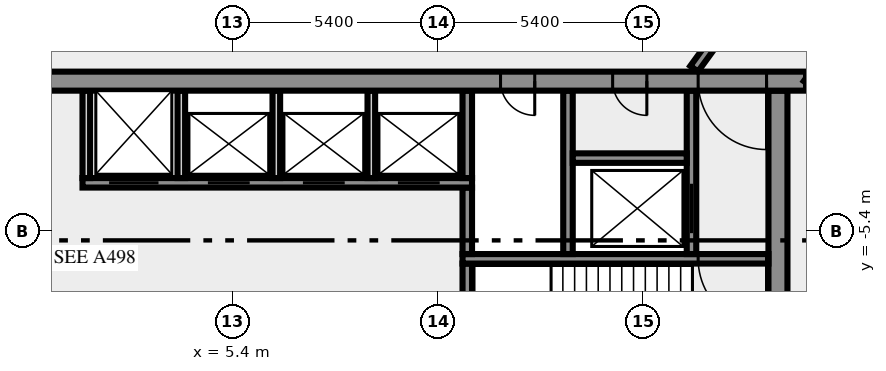
"""IFC4 building model, lengths in metres.
Left out: names, types, materials, properties, quantities, classifications, styles, units other than length and angle.
Written with IfcOpenShell. Run it as: python <this file> out.ifc"""

import sys

from ifc_helpers import new_model, si_unit, direction, frame, frame_2d, origin, place, context, subcontext, project, spatial, rectangle, extrude, element, fill, save


model = new_model("IFC4")
c1 = context("Model", 3, precision=1e-05, world=origin(), true_north=direction((0.0, 1.0)))
c2 = subcontext(c1, "Body", "Model", "MODEL_VIEW")
j1 = project(units=[si_unit("LENGTHUNIT", "METRE"), si_unit("PLANEANGLEUNIT", "RADIAN")], contexts=[c1])
p1 = place(None, origin())
s1 = spatial("IfcSite", under=j1, at=p1, CompositionType="ELEMENT")
p2 = place(p1, origin())
s2 = spatial("IfcBuilding", under=s1, at=p2, CompositionType="ELEMENT")
p3 = place(p2, frame((0.0, 0.0, 226.0)))
s3 = spatial("IfcBuildingStorey", under=s2, at=p3, CompositionType="ELEMENT", Elevation=226.0)
p4 = place(p3, frame((19.75, -10.5, 0.0), z_axis=(0.0, 0.0, 1.0), x_axis=(0.0, 1.0, 0.0)))
e1 = element("IfcWall", 1, at=p4, inside=s3, PredefinedType="SHEAR", context=c2, shape_type="SweptSolid", body=[
    extrude(rectangle(XDim=8.8, YDim=0.5, at=frame_2d((4.4, 0.0))), origin(), (0.0, 0.0, 1.0), 3.65),
])
p5 = place(p3, frame((11.575, -7.25, 0.0), z_axis=(0.0, 0.0, 1.0), x_axis=(0.0, 1.0, 0.0)))
e2 = element("IfcWall", 2, at=p5, inside=s3, PredefinedType="SHEAR", context=c2, shape_type="SweptSolid", body=[
    extrude(rectangle(XDim=1.0, YDim=0.25, at=frame_2d((0.5, 0.0))), origin(), (0.0, 0.0, 1.0), 3.65),
])
p6 = place(p3, frame((19.5, -6.125, 0.0), z_axis=(0.0, 0.0, 1.0), x_axis=(-1.0, 0.0, 0.0)))
e3 = element("IfcWall", 3, at=p6, inside=s3, PredefinedType="SHEAR", context=c2, shape_type="SweptSolid", body=[
    extrude(rectangle(XDim=8.05, YDim=0.25, at=frame_2d((4.025, 0.0))), origin(), (0.0, 0.0, 1.0), 3.65),
])
p7 = place(p6, frame((0.05, 0.0, 0.0)))
e4 = element("IfcOpeningElement", 4, at=p7, cuts=e3, PredefinedType="OPENING", context=c2, shape_type="SweptSolid", body=[
    extrude(rectangle(XDim=1.8, YDim=2.1, at=frame_2d((0.9, 1.05))), frame((0.0, 0.135, 0.0), z_axis=(0.0, -1.0, 0.0), x_axis=(1.0, 0.0, 0.0)), (0.0, 0.0, 1.0), 0.27),
])
p8 = place(p3, frame((11.575, -6.0, 0.0), z_axis=(0.0, 0.0, 1.0), x_axis=(0.0, 1.0, 0.0)))
e5 = element("IfcWall", 5, at=p8, inside=s3, PredefinedType="SHEAR", context=c2, shape_type="SweptSolid", body=[
    extrude(rectangle(XDim=1.75, YDim=0.25, at=frame_2d((0.875, 0.0))), origin(), (0.0, 0.0, 1.0), 3.65),
])
p9 = place(p3, frame((14.225, -6.0, 0.0), z_axis=(0.0, 0.0, 1.0), x_axis=(0.0, 1.0, 0.0)))
e6 = element("IfcWall", 6, at=p9, inside=s3, PredefinedType="SHEAR", context=c2, shape_type="SweptSolid", body=[
    extrude(rectangle(XDim=4.3, YDim=0.25, at=frame_2d((2.15, 0.0))), origin(), (0.0, 0.0, 1.0), 3.65),
])
p10 = place(p3, frame((17.475, -6.0, 0.0), z_axis=(0.0, 0.0, 1.0), x_axis=(0.0, 1.0, 0.0)))
e7 = element("IfcWall", 7, at=p10, inside=s3, PredefinedType="SHEAR", context=c2, shape_type="SweptSolid", body=[
    extrude(rectangle(XDim=4.3, YDim=0.25, at=frame_2d((2.15, 0.0))), origin(), (0.0, 0.0, 1.0), 3.65),
])
p11 = place(p10, frame((0.55, 0.0, 0.0)))
e8 = element("IfcOpeningElement", 8, at=p11, cuts=e7, PredefinedType="OPENING", context=c2, shape_type="SweptSolid", body=[
    extrude(rectangle(XDim=1.3, YDim=2.1, at=frame_2d((0.65, 1.05))), frame((0.0, 0.135, 0.0), z_axis=(0.0, -1.0, 0.0), x_axis=(1.0, 0.0, 0.0)), (0.0, 0.0, 1.0), 0.27),
])
p12 = place(p3, frame((1.45, -4.125, 0.0), z_axis=(0.0, 0.0, 1.0), x_axis=(1.0, 0.0, 0.0)))
e9 = element("IfcWall", 9, at=p12, inside=s3, PredefinedType="SHEAR", context=c2, shape_type="SweptSolid", body=[
    extrude(rectangle(XDim=10.25, YDim=0.25, at=frame_2d((5.125, 0.0))), origin(), (0.0, 0.0, 1.0), 3.65),
])
p13 = place(p12, frame((0.7, 0.0, 0.0)))
e10 = element("IfcOpeningElement", 10, at=p13, cuts=e9, PredefinedType="OPENING", context=c2, shape_type="SweptSolid", body=[
    extrude(rectangle(XDim=1.3, YDim=2.1, at=frame_2d((0.65, 1.05))), frame((0.0, 0.135, 0.0), z_axis=(0.0, -1.0, 0.0), x_axis=(1.0, 0.0, 0.0)), (0.0, 0.0, 1.0), 0.27),
])
p14 = place(p12, frame((3.3, 0.0, 0.0)))
e11 = element("IfcOpeningElement", 11, at=p14, cuts=e9, PredefinedType="OPENING", context=c2, shape_type="SweptSolid", body=[
    extrude(rectangle(XDim=1.1, YDim=2.1, at=frame_2d((0.55, 1.05))), frame((0.0, 0.135, 0.0), z_axis=(0.0, -1.0, 0.0), x_axis=(1.0, 0.0, 0.0)), (0.0, 0.0, 1.0), 0.27),
])
p15 = place(p12, frame((5.8, 0.0, 0.0)))
e12 = element("IfcOpeningElement", 12, at=p15, cuts=e9, PredefinedType="OPENING", context=c2, shape_type="SweptSolid", body=[
    extrude(rectangle(XDim=1.1, YDim=2.1, at=frame_2d((0.55, 1.05))), frame((0.0, 0.135, 0.0), z_axis=(0.0, -1.0, 0.0), x_axis=(1.0, 0.0, 0.0)), (0.0, 0.0, 1.0), 0.27),
])
p16 = place(p12, frame((8.3, 0.0, 0.0)))
e13 = element("IfcOpeningElement", 13, at=p16, cuts=e9, PredefinedType="OPENING", context=c2, shape_type="SweptSolid", body=[
    extrude(rectangle(XDim=1.1, YDim=2.1, at=frame_2d((0.55, 1.05))), frame((0.0, 0.135, 0.0), z_axis=(0.0, -1.0, 0.0), x_axis=(1.0, 0.0, 0.0)), (0.0, 0.0, 1.0), 0.27),
])
for number, where, z_axis, x_axis in (
    (14, (1.55, -4.0, 0.0), (0.0, 0.0, 1.0), (0.0, 1.0, 0.0)),
    (15, (4.05, -4.0, 0.0), (0.0, 0.0, 1.0), (0.0, 1.0, 0.0)),
    (16, (6.55, -4.0, 0.0), (0.0, 0.0, 1.0), (0.0, 1.0, 0.0)),
    (17, (9.05, -4.0, 0.0), (0.0, 0.0, 1.0), (0.0, 1.0, 0.0)),
):
    element("IfcWall", number, at=place(p3, frame(where, z_axis=z_axis, x_axis=x_axis)), inside=s3, PredefinedType="SOLIDWALL", context=c2, shape_type="SweptSolid", body=[
        extrude(rectangle(XDim=2.3, YDim=0.2, at=frame_2d((1.15, 0.0))), origin(), (0.0, 0.0, 1.0), 3.65),
    ])
p17 = place(p3, frame((11.575, -4.0, 0.0), z_axis=(0.0, 0.0, 1.0), x_axis=(0.0, 1.0, 0.0)))
e18 = element("IfcWall", 18, at=p17, inside=s3, PredefinedType="SHEAR", context=c2, shape_type="SweptSolid", body=[
    extrude(rectangle(XDim=2.3, YDim=0.25, at=frame_2d((1.15, 0.0))), origin(), (0.0, 0.0, 1.0), 3.65),
])
p18 = place(p3, frame((14.35, -3.475, 0.0), z_axis=(0.0, 0.0, 1.0), x_axis=(1.0, 0.0, 0.0)))
e19 = element("IfcWall", 19, at=p18, inside=s3, PredefinedType="SHEAR", context=c2, shape_type="SweptSolid", body=[
    extrude(rectangle(XDim=3.0, YDim=0.25, at=frame_2d((1.5, 0.0))), origin(), (0.0, 0.0, 1.0), 3.65),
])
p19 = place(p3, frame((20.49, -1.45, 0.0), z_axis=(0.0, 0.0, 1.0), x_axis=(-1.0, 0.0, 0.0)))
e20 = element("IfcWall", 20, at=p19, inside=s3, PredefinedType="SHEAR", context=c2, shape_type="SweptSolid", body=[
    extrude(rectangle(XDim=40.98, YDim=0.5, at=frame_2d((20.49, 0.0))), origin(), (0.0, 0.0, 1.0), 3.65),
])
p20 = place(p19, frame((38.14, 0.0, 0.0)))
e21 = element("IfcOpeningElement", 21, at=p20, cuts=e20, PredefinedType="OPENING", context=c2, shape_type="SweptSolid", body=[
    extrude(rectangle(XDim=1.8, YDim=2.1, at=frame_2d((0.9, 1.05))), frame((0.0, 0.26, 0.0), z_axis=(0.0, -1.0, 0.0), x_axis=(1.0, 0.0, 0.0)), (0.0, 0.0, 1.0), 0.52),
])
p21 = place(p19, frame((36.728, 0.0, 0.0)))
e22 = element("IfcOpeningElement", 22, at=p21, cuts=e20, PredefinedType="OPENING", context=c2, shape_type="SweptSolid", body=[
    extrude(rectangle(XDim=0.8, YDim=2.1, at=frame_2d((0.4, 1.05))), frame((0.0, 0.26, 0.0), z_axis=(0.0, -1.0, 0.0), x_axis=(1.0, 0.0, 0.0)), (0.0, 0.0, 1.0), 0.52),
])
p22 = place(p19, frame((35.153, 0.0, 0.0)))
e23 = element("IfcOpeningElement", 23, at=p22, cuts=e20, PredefinedType="OPENING", context=c2, shape_type="SweptSolid", body=[
    extrude(rectangle(XDim=0.8, YDim=2.1, at=frame_2d((0.4, 1.05))), frame((0.0, 0.26, 0.0), z_axis=(0.0, -1.0, 0.0), x_axis=(1.0, 0.0, 0.0)), (0.0, 0.0, 1.0), 0.52),
])
p23 = place(p19, frame((32.94, 0.0, 0.0)))
e24 = element("IfcOpeningElement", 24, at=p23, cuts=e20, PredefinedType="OPENING", context=c2, shape_type="SweptSolid", body=[
    extrude(rectangle(XDim=0.9, YDim=2.1, at=frame_2d((0.45, 1.05))), frame((0.0, 0.26, 0.0), z_axis=(0.0, -1.0, 0.0), x_axis=(1.0, 0.0, 0.0)), (0.0, 0.0, 1.0), 0.52),
])
p24 = place(p19, frame((30.202, 0.0, 0.0)))
e25 = element("IfcOpeningElement", 25, at=p24, cuts=e20, PredefinedType="OPENING", context=c2, shape_type="SweptSolid", body=[
    extrude(rectangle(XDim=0.9, YDim=2.1, at=frame_2d((0.45, 1.05))), frame((0.0, 0.26, 0.0), z_axis=(0.0, -1.0, 0.0), x_axis=(1.0, 0.0, 0.0)), (0.0, 0.0, 1.0), 0.52),
])
p25 = place(p19, frame((27.74, 0.0, 0.0)))
e26 = element("IfcOpeningElement", 26, at=p25, cuts=e20, PredefinedType="OPENING", context=c2, shape_type="SweptSolid", body=[
    extrude(rectangle(XDim=0.9, YDim=2.1, at=frame_2d((0.45, 1.05))), frame((0.0, 0.26, 0.0), z_axis=(0.0, -1.0, 0.0), x_axis=(1.0, 0.0, 0.0)), (0.0, 0.0, 1.0), 0.52),
])
p26 = place(p19, frame((25.377, 0.0, 0.0)))
e27 = element("IfcOpeningElement", 27, at=p26, cuts=e20, PredefinedType="OPENING", context=c2, shape_type="SweptSolid", body=[
    extrude(rectangle(XDim=0.9, YDim=2.1, at=frame_2d((0.45, 1.05))), frame((0.0, 0.26, 0.0), z_axis=(0.0, -1.0, 0.0), x_axis=(1.0, 0.0, 0.0)), (0.0, 0.0, 1.0), 0.52),
])
p27 = place(p19, frame((20.74, 0.0, 0.0)))
e28 = element("IfcOpeningElement", 28, at=p27, cuts=e20, PredefinedType="OPENING", context=c2, shape_type="SweptSolid", body=[
    extrude(rectangle(XDim=2.0, YDim=2.1, at=frame_2d((1.0, 1.05))), frame((0.0, 0.26, 0.0), z_axis=(0.0, -1.0, 0.0), x_axis=(1.0, 0.0, 0.0)), (0.0, 0.0, 1.0), 0.52),
])
p28 = place(p19, frame((7.14, 0.0, 0.0)))
e29 = element("IfcOpeningElement", 29, at=p28, cuts=e20, PredefinedType="OPENING", context=c2, shape_type="SweptSolid", body=[
    extrude(rectangle(XDim=0.9, YDim=2.1, at=frame_2d((0.45, 1.05))), frame((0.0, 0.26, 0.0), z_axis=(0.0, -1.0, 0.0), x_axis=(1.0, 0.0, 0.0)), (0.0, 0.0, 1.0), 0.52),
])
p29 = place(p19, frame((4.19, 0.0, 0.0)))
e30 = element("IfcOpeningElement", 30, at=p29, cuts=e20, PredefinedType="OPENING", context=c2, shape_type="SweptSolid", body=[
    extrude(rectangle(XDim=0.9, YDim=2.1, at=frame_2d((0.45, 1.05))), frame((0.0, 0.26, 0.0), z_axis=(0.0, -1.0, 0.0), x_axis=(1.0, 0.0, 0.0)), (0.0, 0.0, 1.0), 0.52),
])
p30 = place(p19, frame((1.04, 0.0, 0.0)))
e31 = element("IfcOpeningElement", 31, at=p30, cuts=e20, PredefinedType="OPENING", context=c2, shape_type="SweptSolid", body=[
    extrude(rectangle(XDim=1.8, YDim=2.1, at=frame_2d((0.9, 1.05))), frame((0.0, 0.26, 0.0), z_axis=(0.0, -1.0, 0.0), x_axis=(1.0, 0.0, 0.0)), (0.0, 0.0, 1.0), 0.52),
])
p31 = place(p3, frame((17.545, -1.125, 0.0), z_axis=(0.0, 0.0, 1.0), x_axis=(0.587787966774, 0.809015022181, 0.0)))
e32 = element("IfcWall", 32, at=p31, inside=s3, PredefinedType="SOLIDWALL", context=c2, shape_type="SweptSolid", body=[
    extrude(rectangle(XDim=23.345, YDim=0.25, at=frame_2d((11.672, 0.0))), origin(), (0.0, 0.0, 1.0), 3.65),
])
p32 = place(p31, frame((3.441, 0.0, 0.0)))
e33 = element("IfcOpeningElement", 33, at=p32, cuts=e32, PredefinedType="OPENING", context=c2, shape_type="SweptSolid", body=[
    extrude(rectangle(XDim=0.9, YDim=2.1, at=frame_2d((0.45, 1.05))), frame((0.0, 0.135, 0.0), z_axis=(0.0, -1.0, 0.0), x_axis=(1.0, 0.0, 0.0)), (0.0, 0.0, 1.0), 0.27),
])
p33 = place(p3, frame((33.41, 16.203, 0.0), z_axis=(0.0, 0.0, 1.0), x_axis=(-0.587786711753, -0.809015934013, 0.0)))
e34 = element("IfcWall", 34, at=p33, inside=s3, PredefinedType="SOLIDWALL", context=c2, shape_type="SweptSolid", body=[
    extrude(rectangle(XDim=21.911, YDim=0.25, at=frame_2d((10.956, 0.0))), origin(), (0.0, 0.0, 1.0), 3.65),
])
p34 = place(p33, frame((20.479, 0.0, 0.0)))
e35 = element("IfcOpeningElement", 35, at=p34, cuts=e34, PredefinedType="OPENING", context=c2, shape_type="SweptSolid", body=[
    extrude(rectangle(XDim=0.9, YDim=2.1, at=frame_2d((0.45, 1.05))), frame((0.0, 0.135, 0.0), z_axis=(0.0, -1.0, 0.0), x_axis=(1.0, 0.0, 0.0)), (0.0, 0.0, 1.0), 0.27),
])
p35 = place(p7, origin())
e36 = element("IfcDoor", 36, at=p35, inside=s3, OperationType="DOUBLE_DOOR_SINGLE_SWING", PredefinedType="DOOR", context=c2, shape_type="SweptSolid", body=[
    extrude(rectangle(XDim=1.8, YDim=2.1, at=frame_2d((0.9, 1.05))), frame((0.0, 0.025, 0.0), z_axis=(0.0, -1.0, 0.0), x_axis=(1.0, 0.0, 0.0)), (0.0, 0.0, 1.0), 0.05),
])
fill(e4, e36)
p36 = place(p11, origin())
e37 = element("IfcDoor", 37, at=p36, inside=s3, OperationType="DOUBLE_DOOR_SLIDING", PredefinedType="DOOR", context=c2, shape_type="SweptSolid", body=[
    extrude(rectangle(XDim=1.3, YDim=2.1, at=frame_2d((0.65, 1.05))), frame((0.0, 0.025, 0.0), z_axis=(0.0, -1.0, 0.0), x_axis=(1.0, 0.0, 0.0)), (0.0, 0.0, 1.0), 0.05),
])
fill(e8, e37)
p37 = place(p13, origin())
e38 = element("IfcDoor", 38, at=p37, inside=s3, OperationType="DOUBLE_DOOR_SLIDING", PredefinedType="DOOR", context=c2, shape_type="SweptSolid", body=[
    extrude(rectangle(XDim=1.3, YDim=2.1, at=frame_2d((0.65, 1.05))), frame((0.0, 0.025, 0.0), z_axis=(0.0, -1.0, 0.0), x_axis=(1.0, 0.0, 0.0)), (0.0, 0.0, 1.0), 0.05),
])
fill(e10, e38)
p38 = place(p14, origin())
e39 = element("IfcDoor", 39, at=p38, inside=s3, OperationType="DOUBLE_DOOR_SLIDING", PredefinedType="DOOR", context=c2, shape_type="SweptSolid", body=[
    extrude(rectangle(XDim=1.1, YDim=2.1, at=frame_2d((0.55, 1.05))), frame((0.0, 0.025, 0.0), z_axis=(0.0, -1.0, 0.0), x_axis=(1.0, 0.0, 0.0)), (0.0, 0.0, 1.0), 0.05),
])
fill(e11, e39)
p39 = place(p15, origin())
e40 = element("IfcDoor", 40, at=p39, inside=s3, OperationType="DOUBLE_DOOR_SLIDING", PredefinedType="DOOR", context=c2, shape_type="SweptSolid", body=[
    extrude(rectangle(XDim=1.1, YDim=2.1, at=frame_2d((0.55, 1.05))), frame((0.0, 0.025, 0.0), z_axis=(0.0, -1.0, 0.0), x_axis=(1.0, 0.0, 0.0)), (0.0, 0.0, 1.0), 0.05),
])
fill(e12, e40)
p40 = place(p16, origin())
e41 = element("IfcDoor", 41, at=p40, inside=s3, OperationType="DOUBLE_DOOR_SLIDING", PredefinedType="DOOR", context=c2, shape_type="SweptSolid", body=[
    extrude(rectangle(XDim=1.1, YDim=2.1, at=frame_2d((0.55, 1.05))), frame((0.0, 0.025, 0.0), z_axis=(0.0, -1.0, 0.0), x_axis=(1.0, 0.0, 0.0)), (0.0, 0.0, 1.0), 0.05),
])
fill(e13, e41)
p41 = place(p28, origin())
e42 = element("IfcDoor", 42, at=p41, inside=s3, OperationType="SINGLE_SWING_LEFT", PredefinedType="DOOR", context=c2, shape_type="SweptSolid", body=[
    extrude(rectangle(XDim=0.9, YDim=2.1, at=frame_2d((0.45, 1.05))), frame((0.0, 0.025, 0.0), z_axis=(0.0, -1.0, 0.0), x_axis=(1.0, 0.0, 0.0)), (0.0, 0.0, 1.0), 0.05),
])
fill(e29, e42)
p42 = place(p29, origin())
e43 = element("IfcDoor", 43, at=p42, inside=s3, OperationType="SINGLE_SWING_LEFT", PredefinedType="DOOR", context=c2, shape_type="SweptSolid", body=[
    extrude(rectangle(XDim=0.9, YDim=2.1, at=frame_2d((0.45, 1.05))), frame((0.0, 0.025, 0.0), z_axis=(0.0, -1.0, 0.0), x_axis=(1.0, 0.0, 0.0)), (0.0, 0.0, 1.0), 0.05),
])
fill(e30, e43)
p43 = place(p30, origin())
e44 = element("IfcDoor", 44, at=p43, inside=s3, OperationType="DOUBLE_DOOR_SINGLE_SWING", PredefinedType="DOOR", context=c2, shape_type="SweptSolid", body=[
    extrude(rectangle(XDim=1.8, YDim=2.1, at=frame_2d((0.9, 1.05))), frame((0.0, 0.025, 0.0), z_axis=(0.0, -1.0, 0.0), x_axis=(1.0, 0.0, 0.0)), (0.0, 0.0, 1.0), 0.05),
])
fill(e31, e44)
save(model, sys.argv[1])
